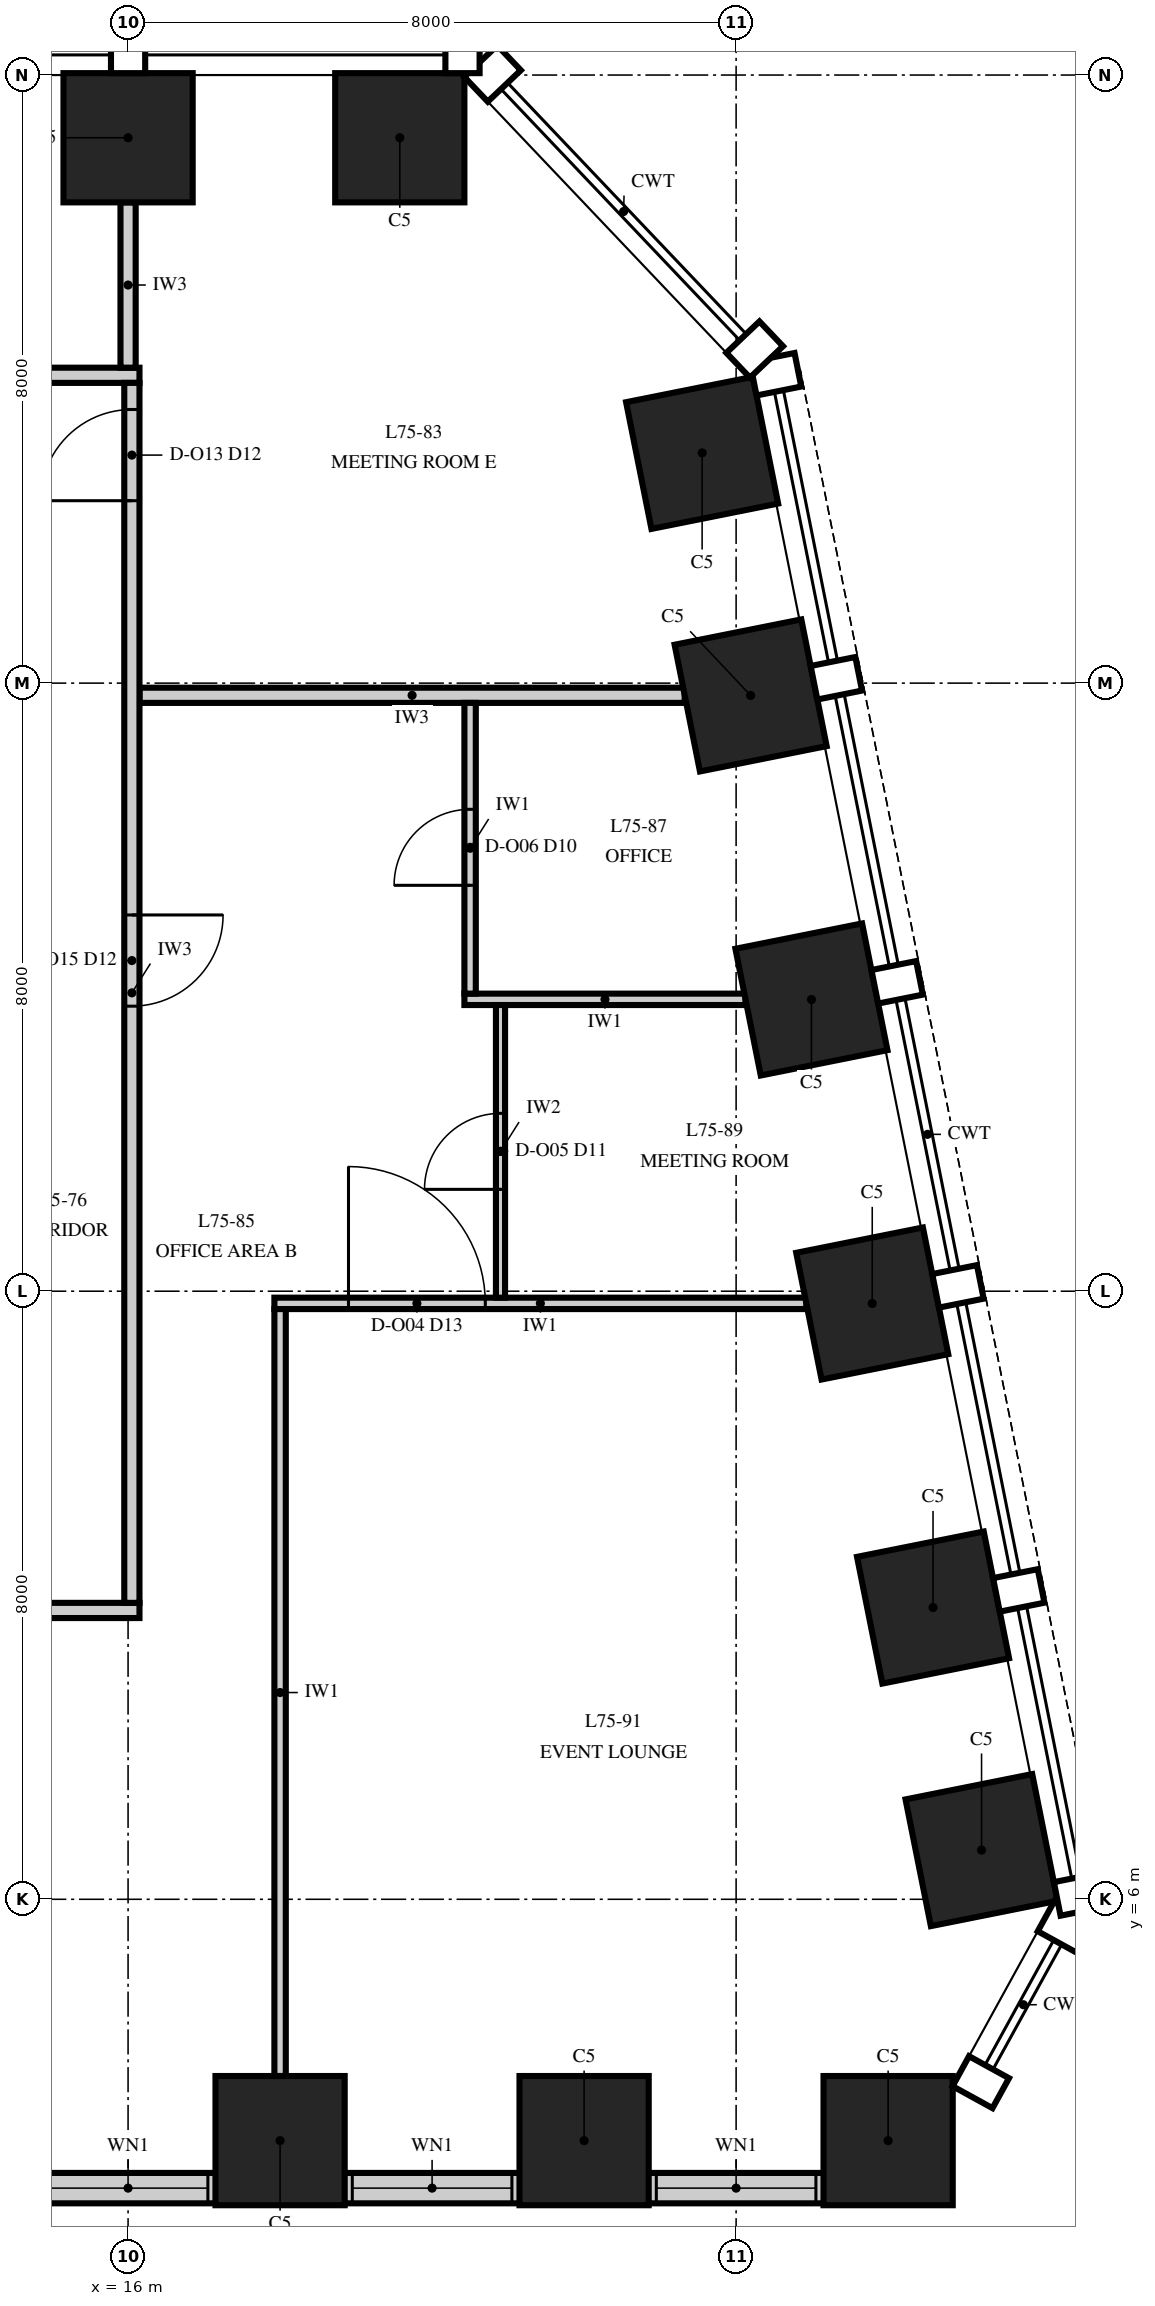
"""IFC4 building model, lengths in metres.
Left out: names, types, materials, properties, quantities, classifications, styles, units other than length and angle.
Written with IfcOpenShell. Run it as: python <this file> out.ifc"""

import sys

from ifc_helpers import new_model, si_unit, direction, frame, frame_2d, origin, origin_2d, place, context, subcontext, project, spatial, rectangle, extrude, element, fill, save


model = new_model("IFC4")
c1 = context("Model", 3, precision=1e-05, world=origin(), true_north=direction((0.0, 1.0)))
c2 = subcontext(c1, "Body", "Model", "MODEL_VIEW")
j1 = project(units=[si_unit("LENGTHUNIT", "METRE"), si_unit("PLANEANGLEUNIT", "RADIAN")], contexts=[c1])
p1 = place(None, origin())
s1 = spatial("IfcSite", under=j1, at=p1, CompositionType="ELEMENT")
p2 = place(p1, origin())
s2 = spatial("IfcBuilding", under=s1, at=p2, CompositionType="ELEMENT")
p3 = place(p2, frame((0.0, 0.0, 320.0)))
s3 = spatial("IfcBuildingStorey", under=s2, at=p3, CompositionType="ELEMENT", Elevation=320.0)
for number, where, z_axis, x_axis in (
    (1, (18.0, 2.825, 0.0), (0.0, 0.0, 1.0), (1.0, 0.0, 0.0)),
    (2, (22.0, 2.825, 0.0), (0.0, 0.0, 1.0), (1.0, 0.0, 0.0)),
    (3, (26.0, 2.825, 0.0), (0.0, 0.0, 1.0), (1.0, 0.0, 0.0)),
    (4, (27.229, 6.647, 0.0), (0.0, 0.0, 1.0), (-0.196, 0.981, 0.0)),
    (5, (26.591, 9.838, 0.0), (0.0, 0.0, 1.0), (-0.196, 0.981, 0.0)),
    (6, (25.791, 13.838, 0.0), (0.0, 0.0, 1.0), (-0.196, 0.981, 0.0)),
    (7, (24.991, 17.838, 0.0), (0.0, 0.0, 1.0), (-0.196, 0.981, 0.0)),
    (8, (24.191, 21.838, 0.0), (0.0, 0.0, 1.0), (-0.196, 0.981, 0.0)),
    (9, (23.553, 25.029, 0.0), (0.0, 0.0, 1.0), (-0.196, 0.981, 0.0)),
    (10, (19.575, 29.175, 0.0), (0.0, 0.0, 1.0), (-1.0, 0.0, 0.0)),
    (11, (16.0, 29.175, 0.0), (0.0, 0.0, 1.0), (-1.0, 0.0, 0.0)),
):
    element("IfcColumn", number, at=place(p3, frame(where, z_axis=z_axis, x_axis=x_axis)), inside=s3, PredefinedType="COLUMN", context=c2, shape_type="SweptSolid", body=[
        extrude(rectangle(XDim=1.7, YDim=1.7, at=origin_2d()), origin(), (0.0, 0.0, 1.0), 4.0),
    ])
p4 = place(p3, frame((-26.0, 2.2, 0.0), z_axis=(0.0, 0.0, 1.0), x_axis=(1.0, 0.0, 0.0)))
e12 = element("IfcWall", 12, at=p4, inside=s3, PredefinedType="SOLIDWALL", context=c2, shape_type="SweptSolid", body=[
    extrude(rectangle(XDim=52.0, YDim=0.4, at=frame_2d((26.0, 0.0))), origin(), (0.0, 0.0, 1.0), 2.0),
])
p5 = place(p4, frame((0.95, 0.0, 0.8)))
e13 = element("IfcOpeningElement", 13, at=p5, cuts=e12, PredefinedType="OPENING", context=c2, shape_type="SweptSolid", body=[
    extrude(rectangle(XDim=2.1, YDim=1.15, at=frame_2d((1.05, 0.575))), frame((0.0, 0.215, 0.0), z_axis=(0.0, -1.0, 0.0), x_axis=(1.0, 0.0, 0.0)), (0.0, 0.0, 1.0), 0.43),
])
p6 = place(p4, frame((4.95, 0.0, 0.8)))
e14 = element("IfcOpeningElement", 14, at=p6, cuts=e12, PredefinedType="OPENING", context=c2, shape_type="SweptSolid", body=[
    extrude(rectangle(XDim=2.1, YDim=1.15, at=frame_2d((1.05, 0.575))), frame((0.0, 0.215, 0.0), z_axis=(0.0, -1.0, 0.0), x_axis=(1.0, 0.0, 0.0)), (0.0, 0.0, 1.0), 0.43),
])
p7 = place(p4, frame((8.95, 0.0, 0.8)))
e15 = element("IfcOpeningElement", 15, at=p7, cuts=e12, PredefinedType="OPENING", context=c2, shape_type="SweptSolid", body=[
    extrude(rectangle(XDim=2.1, YDim=1.15, at=frame_2d((1.05, 0.575))), frame((0.0, 0.215, 0.0), z_axis=(0.0, -1.0, 0.0), x_axis=(1.0, 0.0, 0.0)), (0.0, 0.0, 1.0), 0.43),
])
p8 = place(p4, frame((12.95, 0.0, 0.8)))
e16 = element("IfcOpeningElement", 16, at=p8, cuts=e12, PredefinedType="OPENING", context=c2, shape_type="SweptSolid", body=[
    extrude(rectangle(XDim=2.1, YDim=1.15, at=frame_2d((1.05, 0.575))), frame((0.0, 0.215, 0.0), z_axis=(0.0, -1.0, 0.0), x_axis=(1.0, 0.0, 0.0)), (0.0, 0.0, 1.0), 0.43),
])
p9 = place(p4, frame((16.95, 0.0, 0.8)))
e17 = element("IfcOpeningElement", 17, at=p9, cuts=e12, PredefinedType="OPENING", context=c2, shape_type="SweptSolid", body=[
    extrude(rectangle(XDim=2.1, YDim=1.15, at=frame_2d((1.05, 0.575))), frame((0.0, 0.215, 0.0), z_axis=(0.0, -1.0, 0.0), x_axis=(1.0, 0.0, 0.0)), (0.0, 0.0, 1.0), 0.43),
])
p10 = place(p4, frame((20.95, 0.0, 0.8)))
e18 = element("IfcOpeningElement", 18, at=p10, cuts=e12, PredefinedType="OPENING", context=c2, shape_type="SweptSolid", body=[
    extrude(rectangle(XDim=2.1, YDim=1.15, at=frame_2d((1.05, 0.575))), frame((0.0, 0.215, 0.0), z_axis=(0.0, -1.0, 0.0), x_axis=(1.0, 0.0, 0.0)), (0.0, 0.0, 1.0), 0.43),
])
p11 = place(p4, frame((24.95, 0.0, 0.8)))
e19 = element("IfcOpeningElement", 19, at=p11, cuts=e12, PredefinedType="OPENING", context=c2, shape_type="SweptSolid", body=[
    extrude(rectangle(XDim=2.1, YDim=1.15, at=frame_2d((1.05, 0.575))), frame((0.0, 0.215, 0.0), z_axis=(0.0, -1.0, 0.0), x_axis=(1.0, 0.0, 0.0)), (0.0, 0.0, 1.0), 0.43),
])
p12 = place(p4, frame((28.95, 0.0, 0.8)))
e20 = element("IfcOpeningElement", 20, at=p12, cuts=e12, PredefinedType="OPENING", context=c2, shape_type="SweptSolid", body=[
    extrude(rectangle(XDim=2.1, YDim=1.15, at=frame_2d((1.05, 0.575))), frame((0.0, 0.215, 0.0), z_axis=(0.0, -1.0, 0.0), x_axis=(1.0, 0.0, 0.0)), (0.0, 0.0, 1.0), 0.43),
])
p13 = place(p4, frame((32.95, 0.0, 0.8)))
e21 = element("IfcOpeningElement", 21, at=p13, cuts=e12, PredefinedType="OPENING", context=c2, shape_type="SweptSolid", body=[
    extrude(rectangle(XDim=2.1, YDim=1.15, at=frame_2d((1.05, 0.575))), frame((0.0, 0.215, 0.0), z_axis=(0.0, -1.0, 0.0), x_axis=(1.0, 0.0, 0.0)), (0.0, 0.0, 1.0), 0.43),
])
p14 = place(p4, frame((36.95, 0.0, 0.8)))
e22 = element("IfcOpeningElement", 22, at=p14, cuts=e12, PredefinedType="OPENING", context=c2, shape_type="SweptSolid", body=[
    extrude(rectangle(XDim=2.1, YDim=1.15, at=frame_2d((1.05, 0.575))), frame((0.0, 0.215, 0.0), z_axis=(0.0, -1.0, 0.0), x_axis=(1.0, 0.0, 0.0)), (0.0, 0.0, 1.0), 0.43),
])
p15 = place(p4, frame((40.95, 0.0, 0.8)))
e23 = element("IfcOpeningElement", 23, at=p15, cuts=e12, PredefinedType="OPENING", context=c2, shape_type="SweptSolid", body=[
    extrude(rectangle(XDim=2.1, YDim=1.15, at=frame_2d((1.05, 0.575))), frame((0.0, 0.215, 0.0), z_axis=(0.0, -1.0, 0.0), x_axis=(1.0, 0.0, 0.0)), (0.0, 0.0, 1.0), 0.43),
])
p16 = place(p4, frame((44.95, 0.0, 0.8)))
e24 = element("IfcOpeningElement", 24, at=p16, cuts=e12, PredefinedType="OPENING", context=c2, shape_type="SweptSolid", body=[
    extrude(rectangle(XDim=2.1, YDim=1.15, at=frame_2d((1.05, 0.575))), frame((0.0, 0.215, 0.0), z_axis=(0.0, -1.0, 0.0), x_axis=(1.0, 0.0, 0.0)), (0.0, 0.0, 1.0), 0.43),
])
p17 = place(p4, frame((48.95, 0.0, 0.8)))
e25 = element("IfcOpeningElement", 25, at=p17, cuts=e12, PredefinedType="OPENING", context=c2, shape_type="SweptSolid", body=[
    extrude(rectangle(XDim=2.1, YDim=1.15, at=frame_2d((1.05, 0.575))), frame((0.0, 0.215, 0.0), z_axis=(0.0, -1.0, 0.0), x_axis=(1.0, 0.0, 0.0)), (0.0, 0.0, 1.0), 0.43),
])
p18 = place(p3, frame((14.13, 9.8, 0.0), z_axis=(0.0, 0.0, 1.0), x_axis=(1.0, 0.0, 0.0)))
e26 = element("IfcWall", 26, at=p18, inside=s3, PredefinedType="PARTITIONING", context=c2, shape_type="SweptSolid", body=[
    extrude(rectangle(XDim=2.02, YDim=0.2, at=frame_2d((1.01, 0.0))), origin(), (0.0, 0.0, 1.0), 3.75),
])
p19 = place(p3, frame((17.925, 13.84, 0.0), z_axis=(0.0, 0.0, 1.0), x_axis=(1.0, 0.0, 0.0)))
e27 = element("IfcWall", 27, at=p19, inside=s3, PredefinedType="PARTITIONING", context=c2, shape_type="SweptSolid", body=[
    extrude(rectangle(XDim=6.999, YDim=0.15, at=frame_2d((3.5, 0.0))), origin(), (0.0, 0.0, 1.0), 3.13),
])
p20 = place(p19, frame((0.975, 0.0, 0.0)))
e28 = element("IfcOpeningElement", 28, at=p20, cuts=e27, PredefinedType="OPENING", context=c2, shape_type="SweptSolid", body=[
    extrude(rectangle(XDim=1.8, YDim=2.4, at=frame_2d((0.9, 1.2))), frame((0.0, 0.09, 0.0), z_axis=(0.0, -1.0, 0.0), x_axis=(1.0, 0.0, 0.0)), (0.0, 0.0, 1.0), 0.18),
])
p21 = place(p3, frame((20.425, 17.84, 0.0), z_axis=(0.0, 0.0, 1.0), x_axis=(1.0, 0.0, 0.0)))
e29 = element("IfcWall", 29, at=p21, inside=s3, PredefinedType="PARTITIONING", context=c2, shape_type="SweptSolid", body=[
    extrude(rectangle(XDim=3.699, YDim=0.15, at=frame_2d((1.849, 0.0))), origin(), (0.0, 0.0, 1.0), 3.13),
])
p22 = place(p3, frame((16.15, 21.84, 0.0), z_axis=(0.0, 0.0, 1.0), x_axis=(1.0, 0.0, 0.0)))
e30 = element("IfcWall", 30, at=p22, inside=s3, PredefinedType="PARTITIONING", context=c2, shape_type="SweptSolid", body=[
    extrude(rectangle(XDim=7.174, YDim=0.2, at=frame_2d((3.587, 0.0))), origin(), (0.0, 0.0, 1.0), 3.13),
])
p23 = place(p3, frame((-16.15, 26.05, 0.0), z_axis=(0.0, 0.0, 1.0), x_axis=(1.0, 0.0, 0.0)))
e31 = element("IfcWall", 31, at=p23, inside=s3, PredefinedType="PARTITIONING", context=c2, shape_type="SweptSolid", body=[
    extrude(rectangle(XDim=32.3, YDim=0.2, at=frame_2d((16.15, 0.0))), origin(), (0.0, 0.0, 1.0), 3.318),
])
p24 = place(p23, frame((1.55, 0.0, 0.0)))
e32 = element("IfcOpeningElement", 32, at=p24, cuts=e31, PredefinedType="OPENING", context=c2, shape_type="SweptSolid", body=[
    extrude(rectangle(XDim=1.2, YDim=2.4, at=frame_2d((0.6, 1.2))), frame((0.0, 0.115, 0.0), z_axis=(0.0, -1.0, 0.0), x_axis=(1.0, 0.0, 0.0)), (0.0, 0.0, 1.0), 0.23),
])
p25 = place(p23, frame((7.55, 0.0, 0.0)))
e33 = element("IfcOpeningElement", 33, at=p25, cuts=e31, PredefinedType="OPENING", context=c2, shape_type="SweptSolid", body=[
    extrude(rectangle(XDim=1.2, YDim=2.4, at=frame_2d((0.6, 1.2))), frame((0.0, 0.115, 0.0), z_axis=(0.0, -1.0, 0.0), x_axis=(1.0, 0.0, 0.0)), (0.0, 0.0, 1.0), 0.23),
])
p26 = place(p23, frame((15.55, 0.0, 0.0)))
e34 = element("IfcOpeningElement", 34, at=p26, cuts=e31, PredefinedType="OPENING", context=c2, shape_type="SweptSolid", body=[
    extrude(rectangle(XDim=1.2, YDim=2.4, at=frame_2d((0.6, 1.2))), frame((0.0, 0.115, 0.0), z_axis=(0.0, -1.0, 0.0), x_axis=(1.0, 0.0, 0.0)), (0.0, 0.0, 1.0), 0.23),
])
p27 = place(p23, frame((23.55, 0.0, 0.0)))
e35 = element("IfcOpeningElement", 35, at=p27, cuts=e31, PredefinedType="OPENING", context=c2, shape_type="SweptSolid", body=[
    extrude(rectangle(XDim=1.2, YDim=2.4, at=frame_2d((0.6, 1.2))), frame((0.0, 0.115, 0.0), z_axis=(0.0, -1.0, 0.0), x_axis=(1.0, 0.0, 0.0)), (0.0, 0.0, 1.0), 0.23),
])
p28 = place(p23, frame((29.55, 0.0, 0.0)))
e36 = element("IfcOpeningElement", 36, at=p28, cuts=e31, PredefinedType="OPENING", context=c2, shape_type="SweptSolid", body=[
    extrude(rectangle(XDim=1.2, YDim=2.4, at=frame_2d((0.6, 1.2))), frame((0.0, 0.115, 0.0), z_axis=(0.0, -1.0, 0.0), x_axis=(1.0, 0.0, 0.0)), (0.0, 0.0, 1.0), 0.23),
])
p29 = place(p3, frame((16.0, 26.15, 0.0), z_axis=(0.0, 0.0, 1.0), x_axis=(0.0, 1.0, 0.0)))
e37 = element("IfcWall", 37, at=p29, inside=s3, PredefinedType="PARTITIONING", context=c2, shape_type="SweptSolid", body=[
    extrude(rectangle(XDim=2.175, YDim=0.2, at=frame_2d((1.087, 0.0))), origin(), (0.0, 0.0, 1.0), 3.318),
])
p30 = place(p3, frame((16.05, 9.9, 0.0), z_axis=(0.0, 0.0, 1.0), x_axis=(0.0, 1.0, 0.0)))
e38 = element("IfcWall", 38, at=p30, inside=s3, PredefinedType="PARTITIONING", context=c2, shape_type="SweptSolid", body=[
    extrude(rectangle(XDim=16.05, YDim=0.2, at=frame_2d((8.025, 0.0))), origin(), (0.0, 0.0, 1.0), 3.13),
])
p31 = place(p30, frame((14.5, 0.0, 0.0)))
e39 = element("IfcOpeningElement", 39, at=p31, cuts=e38, PredefinedType="OPENING", context=c2, shape_type="SweptSolid", body=[
    extrude(rectangle(XDim=1.2, YDim=2.4, at=frame_2d((0.6, 1.2))), frame((0.0, 0.115, 0.0), z_axis=(0.0, -1.0, 0.0), x_axis=(1.0, 0.0, 0.0)), (0.0, 0.0, 1.0), 0.23),
])
p32 = place(p30, frame((7.85, 0.0, 0.0)))
e40 = element("IfcOpeningElement", 40, at=p32, cuts=e38, PredefinedType="OPENING", context=c2, shape_type="SweptSolid", body=[
    extrude(rectangle(XDim=1.2, YDim=2.4, at=frame_2d((0.6, 1.2))), frame((0.0, 0.115, 0.0), z_axis=(0.0, -1.0, 0.0), x_axis=(1.0, 0.0, 0.0)), (0.0, 0.0, 1.0), 0.23),
])
p33 = place(p3, frame((18.0, 3.675, 0.0), z_axis=(0.0, 0.0, 1.0), x_axis=(0.0, 1.0, 0.0)))
e41 = element("IfcWall", 41, at=p33, inside=s3, PredefinedType="PARTITIONING", context=c2, shape_type="SweptSolid", body=[
    extrude(rectangle(XDim=10.09, YDim=0.15, at=frame_2d((5.045, 0.0))), origin(), (0.0, 0.0, 1.0), 2.742),
])
p34 = place(p3, frame((20.5, 17.915, 0.0), z_axis=(0.0, 0.0, 1.0), x_axis=(0.0, 1.0, 0.0)))
e42 = element("IfcWall", 42, at=p34, inside=s3, PredefinedType="PARTITIONING", context=c2, shape_type="SweptSolid", body=[
    extrude(rectangle(XDim=3.825, YDim=0.15, at=frame_2d((1.913, 0.0))), origin(), (0.0, 0.0, 1.0), 3.13),
])
p35 = place(p34, frame((1.425, 0.0, 0.0)))
e43 = element("IfcOpeningElement", 43, at=p35, cuts=e42, PredefinedType="OPENING", context=c2, shape_type="SweptSolid", body=[
    extrude(rectangle(XDim=1.0, YDim=2.3, at=frame_2d((0.5, 1.15))), frame((0.0, 0.09, 0.0), z_axis=(0.0, -1.0, 0.0), x_axis=(1.0, 0.0, 0.0)), (0.0, 0.0, 1.0), 0.18),
])
p36 = place(p3, frame((20.9, 13.915, 0.0), z_axis=(0.0, 0.0, 1.0), x_axis=(0.0, 1.0, 0.0)))
e44 = element("IfcWall", 44, at=p36, inside=s3, PredefinedType="PARTITIONING", context=c2, shape_type="SweptSolid", body=[
    extrude(rectangle(XDim=3.85, YDim=0.12, at=frame_2d((1.925, 0.0))), origin(), (0.0, 0.0, 1.0), 3.13),
])
p37 = place(p36, frame((1.425, 0.0, 0.0)))
e45 = element("IfcOpeningElement", 45, at=p37, cuts=e44, PredefinedType="OPENING", context=c2, shape_type="SweptSolid", body=[
    extrude(rectangle(XDim=1.0, YDim=2.4, at=frame_2d((0.5, 1.2))), frame((0.0, 0.075, 0.0), z_axis=(0.0, -1.0, 0.0), x_axis=(1.0, 0.0, 0.0)), (0.0, 0.0, 1.0), 0.15),
])
p38 = place(p15, origin())
e46 = element("IfcWindow", 46, at=p38, inside=s3, PartitioningType="SINGLE_PANEL", PredefinedType="WINDOW", context=c2, shape_type="SweptSolid", body=[
    extrude(rectangle(XDim=2.1, YDim=1.15, at=frame_2d((1.05, 0.575))), frame((0.0, 0.03, 0.0), z_axis=(0.0, -1.0, 0.0), x_axis=(1.0, 0.0, 0.0)), (0.0, 0.0, 1.0), 0.06),
])
fill(e23, e46)
p39 = place(p16, origin())
e47 = element("IfcWindow", 47, at=p39, inside=s3, PartitioningType="SINGLE_PANEL", PredefinedType="WINDOW", context=c2, shape_type="SweptSolid", body=[
    extrude(rectangle(XDim=2.1, YDim=1.15, at=frame_2d((1.05, 0.575))), frame((0.0, 0.03, 0.0), z_axis=(0.0, -1.0, 0.0), x_axis=(1.0, 0.0, 0.0)), (0.0, 0.0, 1.0), 0.06),
])
fill(e24, e47)
p40 = place(p17, origin())
e48 = element("IfcWindow", 48, at=p40, inside=s3, PartitioningType="SINGLE_PANEL", PredefinedType="WINDOW", context=c2, shape_type="SweptSolid", body=[
    extrude(rectangle(XDim=2.1, YDim=1.15, at=frame_2d((1.05, 0.575))), frame((0.0, 0.03, 0.0), z_axis=(0.0, -1.0, 0.0), x_axis=(1.0, 0.0, 0.0)), (0.0, 0.0, 1.0), 0.06),
])
fill(e25, e48)
p41 = place(p20, origin())
e49 = element("IfcDoor", 49, at=p41, inside=s3, OperationType="DOUBLE_DOOR_SINGLE_SWING", PredefinedType="DOOR", context=c2, shape_type="SweptSolid", body=[
    extrude(rectangle(XDim=1.8, YDim=2.4, at=frame_2d((0.9, 1.2))), frame((0.0, 0.075, 0.0), z_axis=(0.0, -1.0, 0.0), x_axis=(1.0, 0.0, 0.0)), (0.0, 0.0, 1.0), 0.149),
])
fill(e28, e49)
p42 = place(p37, origin())
e50 = element("IfcDoor", 50, at=p42, inside=s3, OperationType="SINGLE_SWING_RIGHT", PredefinedType="DOOR", context=c2, shape_type="SweptSolid", body=[
    extrude(rectangle(XDim=1.0, YDim=2.4, at=frame_2d((0.5, 1.2))), frame((0.0, 0.06, 0.0), z_axis=(0.0, -1.0, 0.0), x_axis=(1.0, 0.0, 0.0)), (0.0, 0.0, 1.0), 0.12),
])
fill(e45, e50)
p43 = place(p35, origin())
e51 = element("IfcDoor", 51, at=p43, inside=s3, OperationType="SINGLE_SWING_LEFT", PredefinedType="DOOR", context=c2, shape_type="SweptSolid", body=[
    extrude(rectangle(XDim=1.0, YDim=2.3, at=frame_2d((0.5, 1.15))), frame((0.0, 0.075, 0.0), z_axis=(0.0, -1.0, 0.0), x_axis=(1.0, 0.0, 0.0)), (0.0, 0.0, 1.0), 0.149),
])
fill(e43, e51)
p44 = place(p31, origin())
e52 = element("IfcDoor", 52, at=p44, inside=s3, OperationType="SINGLE_SWING_LEFT", PredefinedType="DOOR", context=c2, shape_type="SweptSolid", body=[
    extrude(rectangle(XDim=1.2, YDim=2.4, at=frame_2d((0.6, 1.2))), frame((0.0, 0.1, 0.0), z_axis=(0.0, -1.0, 0.0), x_axis=(1.0, 0.0, 0.0)), (0.0, 0.0, 1.0), 0.199),
])
fill(e39, e52)
p45 = place(p32, frame((1.2, 0.0, 0.0), z_axis=(0.0, 0.0, 1.0), x_axis=(-1.0, 0.0, 0.0)))
e53 = element("IfcDoor", 53, at=p45, inside=s3, OperationType="SINGLE_SWING_LEFT", PredefinedType="DOOR", context=c2, shape_type="SweptSolid", body=[
    extrude(rectangle(XDim=1.2, YDim=2.4, at=frame_2d((0.6, 1.2))), frame((0.0, 0.1, 0.0), z_axis=(0.0, -1.0, 0.0), x_axis=(1.0, 0.0, 0.0)), (0.0, 0.0, 1.0), 0.199),
])
fill(e40, e53)
save(model, sys.argv[1])
